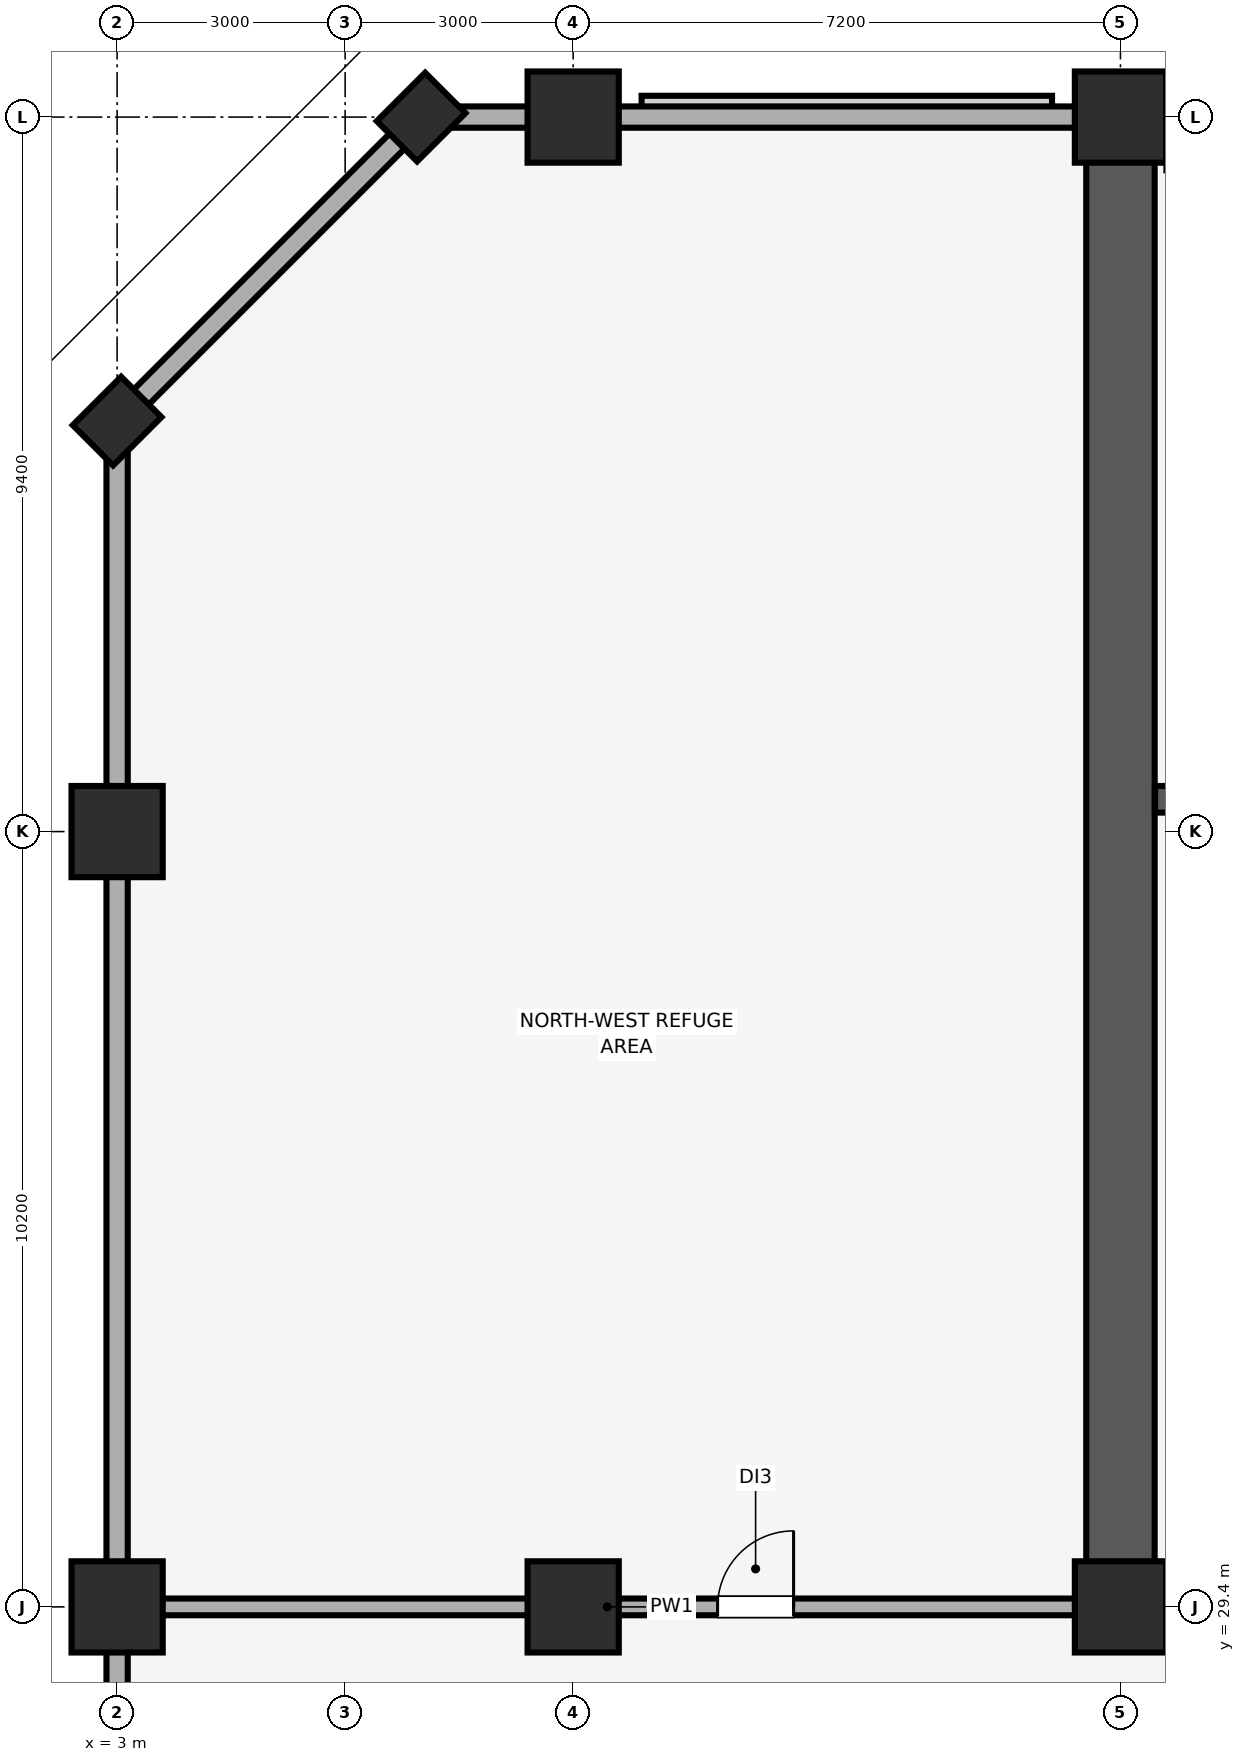
"""IFC4 building model, lengths in metres.
Left out: names, types, materials, properties, quantities, classifications, styles, units other than length and angle.
Written with IfcOpenShell. Run it as: python <this file> out.ifc"""

import sys

from ifc_helpers import new_model, si_unit, direction, frame, frame_2d, origin, origin_2d, place, context, subcontext, project, spatial, rectangle, extrude, element, fill, save


model = new_model("IFC4")
c1 = context("Model", 3, precision=1e-05, world=origin(), true_north=direction((0.0, 1.0)))
c2 = subcontext(c1, "Body", "Model", "MODEL_VIEW")
j1 = project(units=[si_unit("LENGTHUNIT", "METRE"), si_unit("PLANEANGLEUNIT", "RADIAN")], contexts=[c1])
p1 = place(None, origin())
s1 = spatial("IfcSite", under=j1, at=p1, CompositionType="ELEMENT")
p2 = place(p1, origin())
s2 = spatial("IfcBuilding", under=s1, at=p2, CompositionType="ELEMENT")
p3 = place(p2, frame((0.0, 0.0, 184.75)))
s3 = spatial("IfcBuildingStorey", under=s2, at=p3, CompositionType="ELEMENT", Elevation=184.75)
for number, where, z_axis, x_axis in (
    (1, (3.0, 29.4, 0.0), (0.0, 0.0, 1.0), (1.0, 0.0, 0.0)),
    (2, (3.0, 39.6, 0.0), (0.0, 0.0, 1.0), (1.0, 0.0, 0.0)),
):
    element("IfcColumn", number, at=place(p3, frame(where, z_axis=z_axis, x_axis=x_axis)), inside=s3, PredefinedType="COLUMN", context=c2, shape_type="SweptSolid", body=[
        extrude(rectangle(XDim=1.2, YDim=1.2, at=origin_2d()), origin(), (0.0, 0.0, 1.0), 5.16),
    ])
for number, where, z_axis, x_axis in (
    (3, (7.0, 49.0, 0.0), (0.0, 0.0, 1.0), (0.707, 0.707, 0.0)),
    (4, (3.0, 45.0, 0.0), (0.0, 0.0, 1.0), (0.707, 0.707, 0.0)),
):
    element("IfcColumn", number, at=place(p3, frame(where, z_axis=z_axis, x_axis=x_axis)), inside=s3, PredefinedType="PILASTER", context=c2, shape_type="SweptSolid", body=[
        extrude(rectangle(XDim=0.9, YDim=0.75, at=origin_2d()), origin(), (0.0, 0.0, 1.0), 5.16),
    ])
for number, where, z_axis, x_axis in (
    (5, (9.0, 29.4, 0.0), (0.0, 0.0, 1.0), (1.0, 0.0, 0.0)),
    (6, (9.0, 49.0, 0.0), (0.0, 0.0, 1.0), (1.0, 0.0, 0.0)),
    (7, (16.2, 29.4, 0.0), (0.0, 0.0, 1.0), (1.0, 0.0, 0.0)),
    (8, (16.2, 49.0, 0.0), (0.0, 0.0, 1.0), (1.0, 0.0, 0.0)),
):
    element("IfcColumn", number, at=place(p3, frame(where, z_axis=z_axis, x_axis=x_axis)), inside=s3, PredefinedType="COLUMN", context=c2, shape_type="SweptSolid", body=[
        extrude(rectangle(XDim=1.2, YDim=1.2, at=origin_2d()), origin(), (0.0, 0.0, 1.0), 5.16),
    ])
p4 = place(p3, frame((77.0, 49.0, 0.0), z_axis=(0.0, 0.0, 1.0), x_axis=(-1.0, 0.0, 0.0)))
e9 = element("IfcWall", 9, at=p4, inside=s3, PredefinedType="SOLIDWALL", context=c2, shape_type="SweptSolid", body=[
    extrude(rectangle(XDim=70.0, YDim=0.28, at=frame_2d((35.0, 0.0))), origin(), (0.0, 0.0, 1.0), 4.36),
])
p5 = place(p3, frame((7.0, 49.0, 0.0), z_axis=(0.0, 0.0, 1.0), x_axis=(-0.707106781187, -0.707106781187, 0.0)))
e10 = element("IfcWall", 10, at=p5, inside=s3, PredefinedType="SOLIDWALL", context=c2, shape_type="SweptSolid", body=[
    extrude(rectangle(XDim=5.657, YDim=0.28, at=frame_2d((2.828, 0.0))), origin(), (0.0, 0.0, 1.0), 4.36),
])
p6 = place(p3, frame((3.0, 45.0, 0.0), z_axis=(0.0, 0.0, 1.0), x_axis=(0.0, -1.0, 0.0)))
e11 = element("IfcWall", 11, at=p6, inside=s3, PredefinedType="SOLIDWALL", context=c2, shape_type="SweptSolid", body=[
    extrude(rectangle(XDim=38.0, YDim=0.28, at=frame_2d((19.0, 0.0))), origin(), (0.0, 0.0, 1.0), 4.36),
])
p7 = place(p3, frame((16.2, 29.4, 0.0), z_axis=(0.0, 0.0, 1.0), x_axis=(0.0, 1.0, 0.0)))
e12 = element("IfcWall", 12, at=p7, inside=s3, PredefinedType="SHEAR", context=c2, shape_type="SweptSolid", body=[
    extrude(rectangle(XDim=19.2, YDim=0.9, at=frame_2d((9.6, 0.0))), origin(), (0.0, 0.0, 1.0), 5.16),
])
p8 = place(p3, frame((16.655, 29.4, 0.0), z_axis=(0.0, 0.0, 1.0), x_axis=(1.0, 0.0, 0.0)))
e13 = element("IfcWall", 13, at=p8, inside=s3, PredefinedType="SHEAR", context=c2, shape_type="SweptSolid", body=[
    extrude(rectangle(XDim=6.945, YDim=0.9, at=frame_2d((3.473, 0.0))), origin(), (0.0, 0.0, 1.0), 5.16),
])
p9 = place(p3, frame((16.655, 40.025, 0.0), z_axis=(0.0, 0.0, 1.0), x_axis=(1.0, 0.0, 0.0)))
e14 = element("IfcWall", 14, at=p9, inside=s3, PredefinedType="SHEAR", context=c2, shape_type="SweptSolid", body=[
    extrude(rectangle(XDim=4.2, YDim=0.35, at=frame_2d((2.1, 0.0))), origin(), (0.0, 0.0, 1.0), 5.16),
])
p10 = place(p9, frame((1.81, 0.0, 0.0)))
e15 = element("IfcOpeningElement", 15, at=p10, cuts=e14, PredefinedType="OPENING", context=c2, shape_type="SweptSolid", body=[
    extrude(rectangle(XDim=1.15, YDim=2.15, at=frame_2d((0.575, 1.075))), frame((0.0, 0.185, 0.0), z_axis=(0.0, -1.0, 0.0), x_axis=(1.0, 0.0, 0.0)), (0.0, 0.0, 1.0), 0.37),
])
p11 = place(p3, frame((3.15, 29.4, 0.0), z_axis=(0.0, 0.0, 1.0), x_axis=(1.0, 0.0, 0.0)))
e16 = element("IfcWall", 16, at=p11, inside=s3, PredefinedType="PARTITIONING", context=c2, shape_type="SweptSolid", body=[
    extrude(rectangle(XDim=12.595, YDim=0.22, at=frame_2d((6.298, 0.0))), origin(), (0.0, 0.0, 1.0), 4.51),
])
p12 = place(p11, frame((7.75, 0.0, 0.0)))
e17 = element("IfcOpeningElement", 17, at=p12, cuts=e16, PredefinedType="OPENING", context=c2, shape_type="SweptSolid", body=[
    extrude(rectangle(XDim=1.0, YDim=2.15, at=frame_2d((0.5, 1.075))), frame((0.0, 0.12, 0.0), z_axis=(0.0, -1.0, 0.0), x_axis=(1.0, 0.0, 0.0)), (0.0, 0.0, 1.0), 0.24),
])
p13 = place(p12, origin())
e18 = element("IfcDoor", 18, at=p13, inside=s3, OperationType="SINGLE_SWING_RIGHT", PredefinedType="DOOR", context=c2, shape_type="SweptSolid", body=[
    extrude(rectangle(XDim=1.0, YDim=2.15, at=frame_2d((0.5, 1.075))), frame((0.0, 0.025, 0.0), z_axis=(0.0, -1.0, 0.0), x_axis=(1.0, 0.0, 0.0)), (0.0, 0.0, 1.0), 0.05),
])
fill(e17, e18)
save(model, sys.argv[1])
